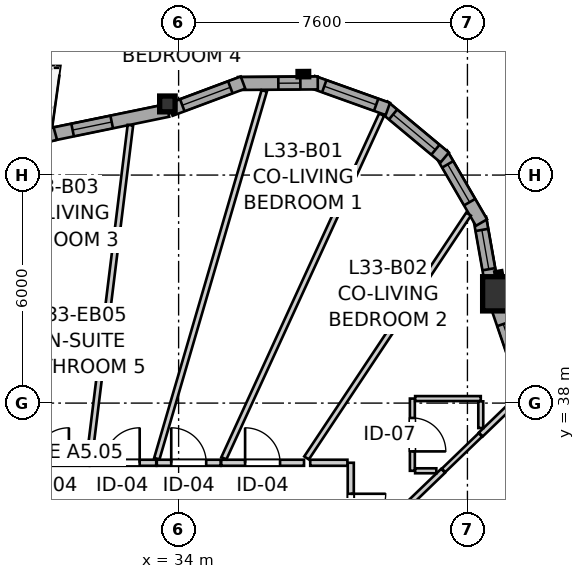
"""IFC4 building model, lengths in metres.
Left out: names, types, materials, properties, quantities, classifications, styles, units other than length and angle.
Written with IfcOpenShell. Run it as: python <this file> out.ifc"""

import sys

from ifc_helpers import new_model, si_unit, direction, frame, frame_2d, origin, origin_2d, place, context, subcontext, project, spatial, rectangle, i_section, extrude, source, transform, mapped, element, fill, save


model = new_model("IFC4")
c1 = context("Model", 3, precision=1e-05, world=origin(), true_north=direction((0.0, 1.0)))
c2 = subcontext(c1, "Body", "Model", "MODEL_VIEW")
j1 = project(units=[si_unit("LENGTHUNIT", "METRE"), si_unit("PLANEANGLEUNIT", "RADIAN")], contexts=[c1])
p1 = place(None, origin())
s1 = spatial("IfcSite", under=j1, at=p1, CompositionType="ELEMENT")
p2 = place(p1, origin())
s2 = spatial("IfcBuilding", under=s1, at=p2, CompositionType="ELEMENT")
p3 = place(p2, frame((0.0, 0.0, 112.0)))
s3 = spatial("IfcBuildingStorey", under=s2, at=p3, CompositionType="ELEMENT", Elevation=112.0)
m1 = source(origin(), c2, "Body", "SweptSolid", [
    extrude(rectangle(XDim=0.9, YDim=0.9, at=origin_2d()), origin(), (0.0, 0.0, 1.0), 2.935),
])
p4 = place(p3, frame((42.45, 40.875, 0.0), z_axis=(0.0, 0.0, 1.0), x_axis=(1.0, 0.0, 0.0)))
e1 = element("IfcColumn", 1, at=p4, inside=s3, PredefinedType="COLUMN", context=c2, shape_type="MappedRepresentation", body=[
    mapped(m1, transform((0.0, 0.0, 0.0), x_axis=(1.0, 0.0, 0.0), y_axis=(0.0, 1.0, 0.0), z_axis=(0.0, 0.0, 1.0), scale=1.0)),
])
m2 = source(origin(), c2, "Body", "SweptSolid", [
    extrude(i_section(OverallWidth=0.406, OverallDepth=0.416, WebThickness=0.027, FlangeThickness=0.044, FilletRadius=0.015, at=origin_2d()), origin(), (0.0, 0.0, 1.0), 2.935),
])
p5 = place(p3, frame((33.704, 45.872, 0.0), z_axis=(0.0, 0.0, 1.0), x_axis=(1.0, 0.0, 0.0)))
e2 = element("IfcColumn", 2, at=p5, inside=s3, PredefinedType="PILASTER", context=c2, shape_type="MappedRepresentation", body=[
    mapped(m2, transform((0.0, 0.0, 0.0), x_axis=(1.0, 0.0, 0.0), y_axis=(0.0, 1.0, 0.0), z_axis=(0.0, 0.0, 1.0), scale=1.0)),
])
p6 = place(p3, frame((43.319, 37.809, 0.0), z_axis=(0.0, 0.0, 1.0), x_axis=(-0.323586371726, 0.946198636669, 0.0)))
e3 = element("IfcWall", 3, at=p6, inside=s3, PredefinedType="SOLIDWALL", context=c2, shape_type="SweptSolid", body=[
    extrude(rectangle(XDim=2.952, YDim=0.34, at=frame_2d((1.476, 0.0))), origin(), (0.0, 0.0, 1.0), 2.465),
])
p7 = place(p6, frame((0.949, 0.0, 0.82)))
e4 = element("IfcOpeningElement", 4, at=p7, cuts=e3, PredefinedType="OPENING", context=c2, shape_type="SweptSolid", body=[
    extrude(rectangle(XDim=1.45, YDim=1.25, at=frame_2d((0.725, 0.625))), frame((0.0, 0.18, 0.0), z_axis=(0.0, -1.0, 0.0), x_axis=(1.0, 0.0, 0.0)), (0.0, 0.0, 1.0), 0.36),
])
p8 = place(p3, frame((42.242, 41.072, 0.0), z_axis=(0.0, 0.0, 1.0), x_axis=(-0.17440141227, 0.984674640375, 0.0)))
e5 = element("IfcWall", 5, at=p8, inside=s3, PredefinedType="SOLIDWALL", context=c2, shape_type="SweptSolid", body=[
    extrude(rectangle(XDim=1.831, YDim=0.34, at=frame_2d((0.916, 0.0))), origin(), (0.0, 0.0, 1.0), 2.465),
])
p9 = place(p8, frame((0.457, 0.0, 0.82)))
e6 = element("IfcOpeningElement", 6, at=p9, cuts=e5, PredefinedType="OPENING", context=c2, shape_type="SweptSolid", body=[
    extrude(rectangle(XDim=1.05, YDim=1.45, at=frame_2d((0.525, 0.725))), frame((0.0, 0.18, 0.0), z_axis=(0.0, -1.0, 0.0), x_axis=(1.0, 0.0, 0.0)), (0.0, 0.0, 1.0), 0.36),
])
p10 = place(p3, frame((41.969, 42.749, 0.0), z_axis=(0.0, 0.0, 1.0), x_axis=(-0.501989603552, 0.864873654313, 0.0)))
e7 = element("IfcWall", 7, at=p10, inside=s3, PredefinedType="SOLIDWALL", context=c2, shape_type="SweptSolid", body=[
    extrude(rectangle(XDim=2.099, YDim=0.34, at=frame_2d((1.05, 0.0))), origin(), (0.0, 0.0, 1.0), 2.465),
])
p11 = place(p10, frame((0.622, 0.0, 0.82)))
e8 = element("IfcOpeningElement", 8, at=p11, cuts=e7, PredefinedType="OPENING", context=c2, shape_type="SweptSolid", body=[
    extrude(rectangle(XDim=1.15, YDim=1.2, at=frame_2d((0.575, 0.6))), frame((0.0, 0.18, 0.0), z_axis=(0.0, -1.0, 0.0), x_axis=(1.0, 0.0, 0.0)), (0.0, 0.0, 1.0), 0.36),
])
p12 = place(p3, frame((41.002, 44.462, 0.0), z_axis=(0.0, 0.0, 1.0), x_axis=(-0.768488123124, 0.639864051669, 0.0)))
e9 = element("IfcWall", 9, at=p12, inside=s3, PredefinedType="SOLIDWALL", context=c2, shape_type="SweptSolid", body=[
    extrude(rectangle(XDim=2.099, YDim=0.34, at=frame_2d((1.05, 0.0))), origin(), (0.0, 0.0, 1.0), 2.465),
])
p13 = place(p12, frame((0.319, 0.0, 0.82)))
e10 = element("IfcOpeningElement", 10, at=p13, cuts=e9, PredefinedType="OPENING", context=c2, shape_type="SweptSolid", body=[
    extrude(rectangle(XDim=1.45, YDim=1.25, at=frame_2d((0.725, 0.625))), frame((0.0, 0.18, 0.0), z_axis=(0.0, -1.0, 0.0), x_axis=(1.0, 0.0, 0.0)), (0.0, 0.0, 1.0), 0.36),
])
p14 = place(p3, frame((39.506, 45.739, 0.0), z_axis=(0.0, 0.0, 1.0), x_axis=(-0.941486401639, 0.33705096874, 0.0)))
e11 = element("IfcWall", 11, at=p14, inside=s3, PredefinedType="SOLIDWALL", context=c2, shape_type="SweptSolid", body=[
    extrude(rectangle(XDim=2.099, YDim=0.34, at=frame_2d((1.05, 0.0))), origin(), (0.0, 0.0, 1.0), 2.465),
])
p15 = place(p14, frame((0.327, 0.0, 0.82)))
e12 = element("IfcOpeningElement", 12, at=p15, cuts=e11, PredefinedType="OPENING", context=c2, shape_type="SweptSolid", body=[
    extrude(rectangle(XDim=1.45, YDim=1.25, at=frame_2d((0.725, 0.625))), frame((0.0, 0.18, 0.0), z_axis=(0.0, -1.0, 0.0), x_axis=(1.0, 0.0, 0.0)), (0.0, 0.0, 1.0), 0.36),
])
p16 = place(p3, frame((37.662, 46.424, 0.0), z_axis=(0.0, 0.0, 1.0), x_axis=(-0.999976456891, -0.00686189939, 0.0)))
e13 = element("IfcWall", 13, at=p16, inside=s3, PredefinedType="SOLIDWALL", context=c2, shape_type="SweptSolid", body=[
    extrude(rectangle(XDim=2.099, YDim=0.34, at=frame_2d((1.05, 0.0))), origin(), (0.0, 0.0, 1.0), 2.465),
])
p17 = place(p16, frame((0.458, 0.0, 0.82)))
e14 = element("IfcOpeningElement", 14, at=p17, cuts=e13, PredefinedType="OPENING", context=c2, shape_type="SweptSolid", body=[
    extrude(rectangle(XDim=0.58, YDim=1.35, at=frame_2d((0.29, 0.675))), frame((0.0, 0.18, 0.0), z_axis=(0.0, -1.0, 0.0), x_axis=(1.0, 0.0, 0.0)), (0.0, 0.0, 1.0), 0.36),
])
p18 = place(p3, frame((35.695, 46.434, 0.0), z_axis=(0.0, 0.0, 1.0), x_axis=(-0.9368002254, -0.349864741994, 0.0)))
e15 = element("IfcWall", 15, at=p18, inside=s3, PredefinedType="SOLIDWALL", context=c2, shape_type="SweptSolid", body=[
    extrude(rectangle(XDim=2.041, YDim=0.34, at=frame_2d((1.021, 0.0))), origin(), (0.0, 0.0, 1.0), 2.465),
])
p19 = place(p18, frame((0.355, 0.0, 0.82)))
e16 = element("IfcOpeningElement", 16, at=p19, cuts=e15, PredefinedType="OPENING", context=c2, shape_type="SweptSolid", body=[
    extrude(rectangle(XDim=1.35, YDim=1.45, at=frame_2d((0.675, 0.725))), frame((0.0, 0.18, 0.0), z_axis=(0.0, -1.0, 0.0), x_axis=(1.0, 0.0, 0.0)), (0.0, 0.0, 1.0), 0.36),
])
p20 = place(p3, frame((33.719, 45.701, 0.0), z_axis=(0.0, 0.0, 1.0), x_axis=(-0.979417849231, -0.201843198072, 0.0)))
e17 = element("IfcWall", 17, at=p20, inside=s3, PredefinedType="SOLIDWALL", context=c2, shape_type="SweptSolid", body=[
    extrude(rectangle(XDim=3.113, YDim=0.34, at=frame_2d((1.557, 0.0))), origin(), (0.0, 0.0, 1.0), 2.465),
])
p21 = place(p20, frame((1.511, 0.0, 0.82)))
e18 = element("IfcOpeningElement", 18, at=p21, cuts=e17, PredefinedType="OPENING", context=c2, shape_type="SweptSolid", body=[
    extrude(rectangle(XDim=1.05, YDim=1.45, at=frame_2d((0.525, 0.725))), frame((0.0, 0.18, 0.0), z_axis=(0.0, -1.0, 0.0), x_axis=(1.0, 0.0, 0.0)), (0.0, 0.0, 1.0), 0.36),
])
p22 = place(p3, frame((30.755, 45.094, 0.0), z_axis=(0.0, 0.0, 1.0), x_axis=(-0.963040794714, -0.269355578589, 0.0)))
e19 = element("IfcWall", 19, at=p22, inside=s3, PredefinedType="SOLIDWALL", context=c2, shape_type="SweptSolid", body=[
    extrude(rectangle(XDim=2.839, YDim=0.34, at=frame_2d((1.419, 0.0))), origin(), (0.0, 0.0, 1.0), 2.465),
])
p23 = place(p22, frame((0.373, 0.0, 0.82)))
e20 = element("IfcOpeningElement", 20, at=p23, cuts=e19, PredefinedType="OPENING", context=c2, shape_type="SweptSolid", body=[
    extrude(rectangle(XDim=1.05, YDim=1.45, at=frame_2d((0.525, 0.725))), frame((0.0, 0.18, 0.0), z_axis=(0.0, -1.0, 0.0), x_axis=(1.0, 0.0, 0.0)), (0.0, 0.0, 1.0), 0.36),
])
p24 = place(p22, frame((1.792, 0.0, 0.82)))
e21 = element("IfcOpeningElement", 21, at=p24, cuts=e19, PredefinedType="OPENING", context=c2, shape_type="SweptSolid", body=[
    extrude(rectangle(XDim=0.58, YDim=1.35, at=frame_2d((0.29, 0.675))), frame((0.0, 0.18, 0.0), z_axis=(0.0, -1.0, 0.0), x_axis=(1.0, 0.0, 0.0)), (0.0, 0.0, 1.0), 0.36),
])
p25 = place(p3, frame((38.53, 36.43, 0.0), z_axis=(0.0, 0.0, 1.0), x_axis=(0.0, -1.0, 0.0)))
e22 = element("IfcWall", 22, at=p25, inside=s3, PredefinedType="PARTITIONING", context=c2, shape_type="SweptSolid", body=[
    extrude(rectangle(XDim=2.516, YDim=0.16, at=frame_2d((1.258, 0.0))), origin(), (0.0, 0.0, 1.0), 2.573),
])
p26 = place(p25, frame((0.816, 0.0, 0.0)))
e23 = element("IfcOpeningElement", 23, at=p26, cuts=e22, PredefinedType="OPENING", context=c2, shape_type="SweptSolid", body=[
    extrude(rectangle(XDim=0.92, YDim=2.1, at=frame_2d((0.46, 1.05))), frame((0.0, 0.09, 0.0), z_axis=(0.0, -1.0, 0.0), x_axis=(1.0, 0.0, 0.0)), (0.0, 0.0, 1.0), 0.18),
])
p27 = place(p3, frame((35.121, 36.43, 0.0), z_axis=(0.0, 0.0, 1.0), x_axis=(1.0, 0.0, 0.0)))
e24 = element("IfcWall", 24, at=p27, inside=s3, PredefinedType="PARTITIONING", context=c2, shape_type="SweptSolid", body=[
    extrude(rectangle(XDim=2.179, YDim=0.16, at=frame_2d((1.089, 0.0))), origin(), (0.0, 0.0, 1.0), 2.573),
])
p28 = place(p27, frame((0.628, 0.0, 0.0)))
e25 = element("IfcOpeningElement", 25, at=p28, cuts=e24, PredefinedType="OPENING", context=c2, shape_type="SweptSolid", body=[
    extrude(rectangle(XDim=0.92, YDim=2.1, at=frame_2d((0.46, 1.05))), frame((0.0, 0.09, 0.0), z_axis=(0.0, -1.0, 0.0), x_axis=(1.0, 0.0, 0.0)), (0.0, 0.0, 1.0), 0.18),
])
p29 = place(p3, frame((29.7, 36.43, 0.0), z_axis=(0.0, 0.0, 1.0), x_axis=(1.0, 0.0, 0.0)))
e26 = element("IfcWall", 26, at=p29, inside=s3, PredefinedType="PARTITIONING", context=c2, shape_type="SweptSolid", body=[
    extrude(rectangle(XDim=1.951, YDim=0.16, at=frame_2d((0.976, 0.0))), origin(), (0.0, 0.0, 1.0), 2.935),
])
p30 = place(p29, frame((0.493, 0.0, 0.0)))
e27 = element("IfcOpeningElement", 27, at=p30, cuts=e26, PredefinedType="OPENING", context=c2, shape_type="SweptSolid", body=[
    extrude(rectangle(XDim=0.92, YDim=2.1, at=frame_2d((0.46, 1.05))), frame((0.0, 0.09, 0.0), z_axis=(0.0, -1.0, 0.0), x_axis=(1.0, 0.0, 0.0)), (0.0, 0.0, 1.0), 0.18),
])
p31 = place(p3, frame((40.151, 38.119, 0.0), z_axis=(0.0, 0.0, 1.0), x_axis=(0.0, -1.0, 0.0)))
e28 = element("IfcWall", 28, at=p31, inside=s3, PredefinedType="PARTITIONING", context=c2, shape_type="SweptSolid", body=[
    extrude(rectangle(XDim=1.9, YDim=0.13, at=frame_2d((0.95, 0.0))), origin(), (0.0, 0.0, 1.0), 2.935),
])
p32 = place(p31, frame((0.51, 0.0, 0.0)))
e29 = element("IfcOpeningElement", 29, at=p32, cuts=e28, PredefinedType="OPENING", context=c2, shape_type="SweptSolid", body=[
    extrude(rectangle(XDim=0.88, YDim=2.05, at=frame_2d((0.44, 1.025))), frame((0.0, 0.075, 0.0), z_axis=(0.0, -1.0, 0.0), x_axis=(1.0, 0.0, 0.0)), (0.0, 0.0, 1.0), 0.15),
])
p33 = place(p3, frame((31.666, 36.43, 0.0), z_axis=(0.0, 0.0, 1.0), x_axis=(1.0, 0.0, 0.0)))
e30 = element("IfcWall", 30, at=p33, inside=s3, PredefinedType="PARTITIONING", context=c2, shape_type="SweptSolid", body=[
    extrude(rectangle(XDim=1.745, YDim=0.16, at=frame_2d((0.873, 0.0))), origin(), (0.0, 0.0, 1.0), 2.935),
])
p34 = place(p33, frame((0.389, 0.0, 0.0)))
e31 = element("IfcOpeningElement", 31, at=p34, cuts=e30, PredefinedType="OPENING", context=c2, shape_type="SweptSolid", body=[
    extrude(rectangle(XDim=0.92, YDim=2.1, at=frame_2d((0.46, 1.05))), frame((0.0, 0.09, 0.0), z_axis=(0.0, -1.0, 0.0), x_axis=(1.0, 0.0, 0.0)), (0.0, 0.0, 1.0), 0.18),
])
p35 = place(p3, frame((33.426, 36.43, 0.0), z_axis=(0.0, 0.0, 1.0), x_axis=(1.0, 0.0, 0.0)))
e32 = element("IfcWall", 32, at=p35, inside=s3, PredefinedType="PARTITIONING", context=c2, shape_type="SweptSolid", body=[
    extrude(rectangle(XDim=1.68, YDim=0.16, at=frame_2d((0.84, 0.0))), origin(), (0.0, 0.0, 1.0), 2.935),
])
p36 = place(p35, frame((0.38, 0.0, 0.0)))
e33 = element("IfcOpeningElement", 33, at=p36, cuts=e32, PredefinedType="OPENING", context=c2, shape_type="SweptSolid", body=[
    extrude(rectangle(XDim=0.92, YDim=2.1, at=frame_2d((0.46, 1.05))), frame((0.0, 0.09, 0.0), z_axis=(0.0, -1.0, 0.0), x_axis=(1.0, 0.0, 0.0)), (0.0, 0.0, 1.0), 0.18),
])
p37 = place(p3, frame((33.427, 36.538, 0.0), z_axis=(0.0, 0.0, 1.0), x_axis=(0.280326379037, 0.959904745908, 0.0)))
e34 = element("IfcWall", 34, at=p37, inside=s3, PredefinedType="PARTITIONING", context=c2, shape_type="SweptSolid", body=[
    extrude(rectangle(XDim=10.082, YDim=0.145, at=frame_2d((5.041, 0.0))), origin(), (0.0, 0.0, 1.0), 2.935),
])
p38 = place(p3, frame((35.191, 36.548, 0.0), z_axis=(0.0, 0.0, 1.0), x_axis=(0.417154036681, 0.908835799075, 0.0)))
e35 = element("IfcWall", 35, at=p38, inside=s3, PredefinedType="PARTITIONING", context=c2, shape_type="SweptSolid", body=[
    extrude(rectangle(XDim=9.949, YDim=0.145, at=frame_2d((4.974, 0.0))), origin(), (0.0, 0.0, 1.0), 2.935),
])
p39 = place(p3, frame((31.648, 36.527, 0.0), z_axis=(0.0, 0.0, 1.0), x_axis=(0.122371290087, 0.992484391496, 0.0)))
e36 = element("IfcWall", 36, at=p39, inside=s3, PredefinedType="PARTITIONING", context=c2, shape_type="SweptSolid", body=[
    extrude(rectangle(XDim=8.852, YDim=0.145, at=frame_2d((4.426, 0.0))), origin(), (0.0, 0.0, 1.0), 2.935),
])
p40 = place(p3, frame((37.366, 36.557, 0.0), z_axis=(0.0, 0.0, 1.0), x_axis=(0.553463679146, 0.832873313215, 0.0)))
e37 = element("IfcWall", 37, at=p40, inside=s3, PredefinedType="PARTITIONING", context=c2, shape_type="SweptSolid", body=[
    extrude(rectangle(XDim=7.704, YDim=0.145, at=frame_2d((3.852, 0.0))), origin(), (0.0, 0.0, 1.0), 2.935),
])
p41 = place(p3, frame((38.666, 34.009, 0.0), z_axis=(0.0, 0.0, 1.0), x_axis=(0.72031454127, 0.693647577402, 0.0)))
e38 = element("IfcWall", 38, at=p41, inside=s3, PredefinedType="PARTITIONING", context=c2, shape_type="SweptSolid", body=[
    extrude(rectangle(XDim=3.186, YDim=0.145, at=frame_2d((1.593, 0.0))), origin(), (0.0, 0.0, 1.0), 2.935),
])
p42 = place(p3, frame((40.224, 38.119, 0.0), z_axis=(0.0, 0.0, 1.0), x_axis=(1.0, 0.0, 0.0)))
e39 = element("IfcWall", 39, at=p42, inside=s3, PredefinedType="PARTITIONING", context=c2, shape_type="SweptSolid", body=[
    extrude(rectangle(XDim=1.727, YDim=0.13, at=frame_2d((0.863, 0.0))), origin(), (0.0, 0.0, 1.0), 2.935),
])
p43 = place(p3, frame((41.951, 37.173, 0.0), z_axis=(0.0, 0.0, 1.0), x_axis=(0.720559112487, 0.693393514111, 0.0)))
e40 = element("IfcWall", 40, at=p43, inside=s3, PredefinedType="PARTITIONING", context=c2, shape_type="SweptSolid", body=[
    extrude(rectangle(XDim=1.456, YDim=0.145, at=frame_2d((0.728, 0.0))), origin(), (0.0, 0.0, 1.0), 2.935),
])
p44 = place(p3, frame((40.972, 36.229, 0.0), z_axis=(0.0, 0.0, 1.0), x_axis=(0.72014550452, 0.693823069896, 0.0)))
e41 = element("IfcWall", 41, at=p44, inside=s3, PredefinedType="PARTITIONING", context=c2, shape_type="SweptSolid", body=[
    extrude(rectangle(XDim=1.345, YDim=0.13, at=frame_2d((0.672, 0.0))), origin(), (0.0, 0.0, 1.0), 2.935),
])
p45 = place(p3, frame((37.463, 36.43, 0.0), z_axis=(0.0, 0.0, 1.0), x_axis=(1.0, 0.0, 0.0)))
e42 = element("IfcWall", 42, at=p45, inside=s3, PredefinedType="PARTITIONING", context=c2, shape_type="SweptSolid", body=[
    extrude(rectangle(XDim=0.979, YDim=0.16, at=frame_2d((0.489, 0.0))), origin(), (0.0, 0.0, 1.0), 2.573),
])
p46 = place(p3, frame((41.951, 37.344, 0.0), z_axis=(0.0, 0.0, 1.0), x_axis=(0.0, 1.0, 0.0)))
e43 = element("IfcWall", 43, at=p46, inside=s3, PredefinedType="PARTITIONING", context=c2, shape_type="SweptSolid", body=[
    extrude(rectangle(XDim=0.702, YDim=0.13, at=frame_2d((0.351, 0.0))), origin(), (0.0, 0.0, 1.0), 2.935),
])
p47 = place(p3, frame((40.224, 36.219, 0.0), z_axis=(0.0, 0.0, 1.0), x_axis=(1.0, 0.0, 0.0)))
e44 = element("IfcWall", 44, at=p47, inside=s3, PredefinedType="PARTITIONING", context=c2, shape_type="SweptSolid", body=[
    extrude(rectangle(XDim=0.557, YDim=0.13, at=frame_2d((0.278, 0.0))), origin(), (0.0, 0.0, 1.0), 2.935),
])
m3 = source(origin(), c2, "Body", "SweptSolid", [
    extrude(rectangle(XDim=1.45, YDim=1.25, at=frame_2d((0.725, 0.625))), frame((0.0, 0.03, 0.0), z_axis=(0.0, -1.0, 0.0), x_axis=(1.0, 0.0, 0.0)), (0.0, 0.0, 1.0), 0.06),
])
p48 = place(p7, origin())
e45 = element("IfcWindow", 45, at=p48, inside=s3, PartitioningType="SINGLE_PANEL", PredefinedType="WINDOW", context=c2, shape_type="MappedRepresentation", body=[
    mapped(m3, transform((0.0, 0.0, 0.0), x_axis=(1.0, 0.0, 0.0), y_axis=(0.0, 1.0, 0.0), z_axis=(0.0, 0.0, 1.0), scale=1.0)),
])
fill(e4, e45)
m4 = source(origin(), c2, "Body", "SweptSolid", [
    extrude(rectangle(XDim=1.05, YDim=1.45, at=frame_2d((0.525, 0.725))), frame((0.0, 0.03, 0.0), z_axis=(0.0, -1.0, 0.0), x_axis=(1.0, 0.0, 0.0)), (0.0, 0.0, 1.0), 0.06),
])
p49 = place(p9, origin())
e46 = element("IfcWindow", 46, at=p49, inside=s3, PartitioningType="SINGLE_PANEL", PredefinedType="WINDOW", context=c2, shape_type="MappedRepresentation", body=[
    mapped(m4, transform((0.0, 0.0, 0.0), x_axis=(1.0, 0.0, 0.0), y_axis=(0.0, 1.0, 0.0), z_axis=(0.0, 0.0, 1.0), scale=1.0)),
])
fill(e6, e46)
m5 = source(origin(), c2, "Body", "SweptSolid", [
    extrude(rectangle(XDim=1.15, YDim=1.2, at=frame_2d((0.575, 0.6))), frame((0.0, 0.03, 0.0), z_axis=(0.0, -1.0, 0.0), x_axis=(1.0, 0.0, 0.0)), (0.0, 0.0, 1.0), 0.06),
])
p50 = place(p11, origin())
e47 = element("IfcWindow", 47, at=p50, inside=s3, PartitioningType="SINGLE_PANEL", PredefinedType="WINDOW", context=c2, shape_type="MappedRepresentation", body=[
    mapped(m5, transform((0.0, 0.0, 0.0), x_axis=(1.0, 0.0, 0.0), y_axis=(0.0, 1.0, 0.0), z_axis=(0.0, 0.0, 1.0), scale=1.0)),
])
fill(e8, e47)
p51 = place(p13, origin())
e48 = element("IfcWindow", 48, at=p51, inside=s3, PartitioningType="SINGLE_PANEL", PredefinedType="WINDOW", context=c2, shape_type="MappedRepresentation", body=[
    mapped(m3, transform((0.0, 0.0, 0.0), x_axis=(1.0, 0.0, 0.0), y_axis=(0.0, 1.0, 0.0), z_axis=(0.0, 0.0, 1.0), scale=1.0)),
])
fill(e10, e48)
p52 = place(p15, origin())
e49 = element("IfcWindow", 49, at=p52, inside=s3, PartitioningType="SINGLE_PANEL", PredefinedType="WINDOW", context=c2, shape_type="MappedRepresentation", body=[
    mapped(m3, transform((0.0, 0.0, 0.0), x_axis=(1.0, 0.0, 0.0), y_axis=(0.0, 1.0, 0.0), z_axis=(0.0, 0.0, 1.0), scale=1.0)),
])
fill(e12, e49)
m6 = source(origin(), c2, "Body", "SweptSolid", [
    extrude(rectangle(XDim=0.58, YDim=1.35, at=frame_2d((0.29, 0.675))), frame((0.0, 0.03, 0.0), z_axis=(0.0, -1.0, 0.0), x_axis=(1.0, 0.0, 0.0)), (0.0, 0.0, 1.0), 0.06),
])
p53 = place(p17, origin())
e50 = element("IfcWindow", 50, at=p53, inside=s3, PartitioningType="SINGLE_PANEL", PredefinedType="WINDOW", context=c2, shape_type="MappedRepresentation", body=[
    mapped(m6, transform((0.0, 0.0, 0.0), x_axis=(1.0, 0.0, 0.0), y_axis=(0.0, 1.0, 0.0), z_axis=(0.0, 0.0, 1.0), scale=1.0)),
])
fill(e14, e50)
m7 = source(origin(), c2, "Body", "SweptSolid", [
    extrude(rectangle(XDim=1.35, YDim=1.45, at=frame_2d((0.675, 0.725))), frame((0.0, 0.03, 0.0), z_axis=(0.0, -1.0, 0.0), x_axis=(1.0, 0.0, 0.0)), (0.0, 0.0, 1.0), 0.06),
])
p54 = place(p19, origin())
e51 = element("IfcWindow", 51, at=p54, inside=s3, PartitioningType="SINGLE_PANEL", PredefinedType="WINDOW", context=c2, shape_type="MappedRepresentation", body=[
    mapped(m7, transform((0.0, 0.0, 0.0), x_axis=(1.0, 0.0, 0.0), y_axis=(0.0, 1.0, 0.0), z_axis=(0.0, 0.0, 1.0), scale=1.0)),
])
fill(e16, e51)
p55 = place(p21, origin())
e52 = element("IfcWindow", 52, at=p55, inside=s3, PartitioningType="SINGLE_PANEL", PredefinedType="WINDOW", context=c2, shape_type="MappedRepresentation", body=[
    mapped(m4, transform((0.0, 0.0, 0.0), x_axis=(1.0, 0.0, 0.0), y_axis=(0.0, 1.0, 0.0), z_axis=(0.0, 0.0, 1.0), scale=1.0)),
])
fill(e18, e52)
m8 = source(origin(), c2, "Body", "SweptSolid", [
    extrude(rectangle(XDim=0.92, YDim=2.1, at=frame_2d((0.46, 1.05))), frame((0.0, 0.025, 0.0), z_axis=(0.0, -1.0, 0.0), x_axis=(1.0, 0.0, 0.0)), (0.0, 0.0, 1.0), 0.05),
])
p56 = place(p26, origin())
e53 = element("IfcDoor", 53, at=p56, inside=s3, OperationType="SINGLE_SWING_LEFT", PredefinedType="DOOR", context=c2, shape_type="MappedRepresentation", body=[
    mapped(m8, transform((0.0, 0.0, 0.0), x_axis=(1.0, 0.0, 0.0), y_axis=(0.0, 1.0, 0.0), z_axis=(0.0, 0.0, 1.0), scale=1.0)),
])
fill(e23, e53)
p57 = place(p28, origin())
e54 = element("IfcDoor", 54, at=p57, inside=s3, OperationType="SINGLE_SWING_LEFT", PredefinedType="DOOR", context=c2, shape_type="MappedRepresentation", body=[
    mapped(m8, transform((0.0, 0.0, 0.0), x_axis=(1.0, 0.0, 0.0), y_axis=(0.0, 1.0, 0.0), z_axis=(0.0, 0.0, 1.0), scale=1.0)),
])
fill(e25, e54)
p58 = place(p30, origin())
e55 = element("IfcDoor", 55, at=p58, inside=s3, OperationType="SINGLE_SWING_RIGHT", PredefinedType="DOOR", context=c2, shape_type="MappedRepresentation", body=[
    mapped(m8, transform((0.0, 0.0, 0.0), x_axis=(1.0, 0.0, 0.0), y_axis=(0.0, 1.0, 0.0), z_axis=(0.0, 0.0, 1.0), scale=1.0)),
])
fill(e27, e55)
m9 = source(origin(), c2, "Body", "SweptSolid", [
    extrude(rectangle(XDim=0.88, YDim=2.05, at=frame_2d((0.44, 1.025))), frame((0.0, 0.025, 0.0), z_axis=(0.0, -1.0, 0.0), x_axis=(1.0, 0.0, 0.0)), (0.0, 0.0, 1.0), 0.05),
])
p59 = place(p32, origin())
e56 = element("IfcDoor", 56, at=p59, inside=s3, OperationType="SINGLE_SWING_RIGHT", PredefinedType="DOOR", context=c2, shape_type="MappedRepresentation", body=[
    mapped(m9, transform((0.0, 0.0, 0.0), x_axis=(1.0, 0.0, 0.0), y_axis=(0.0, 1.0, 0.0), z_axis=(0.0, 0.0, 1.0), scale=1.0)),
])
fill(e29, e56)
p60 = place(p34, origin())
e57 = element("IfcDoor", 57, at=p60, inside=s3, OperationType="SINGLE_SWING_RIGHT", PredefinedType="DOOR", context=c2, shape_type="MappedRepresentation", body=[
    mapped(m8, transform((0.0, 0.0, 0.0), x_axis=(1.0, 0.0, 0.0), y_axis=(0.0, 1.0, 0.0), z_axis=(0.0, 0.0, 1.0), scale=1.0)),
])
fill(e31, e57)
p61 = place(p36, origin())
e58 = element("IfcDoor", 58, at=p61, inside=s3, OperationType="SINGLE_SWING_LEFT", PredefinedType="DOOR", context=c2, shape_type="MappedRepresentation", body=[
    mapped(m8, transform((0.0, 0.0, 0.0), x_axis=(1.0, 0.0, 0.0), y_axis=(0.0, 1.0, 0.0), z_axis=(0.0, 0.0, 1.0), scale=1.0)),
])
fill(e33, e58)
save(model, sys.argv[1])
